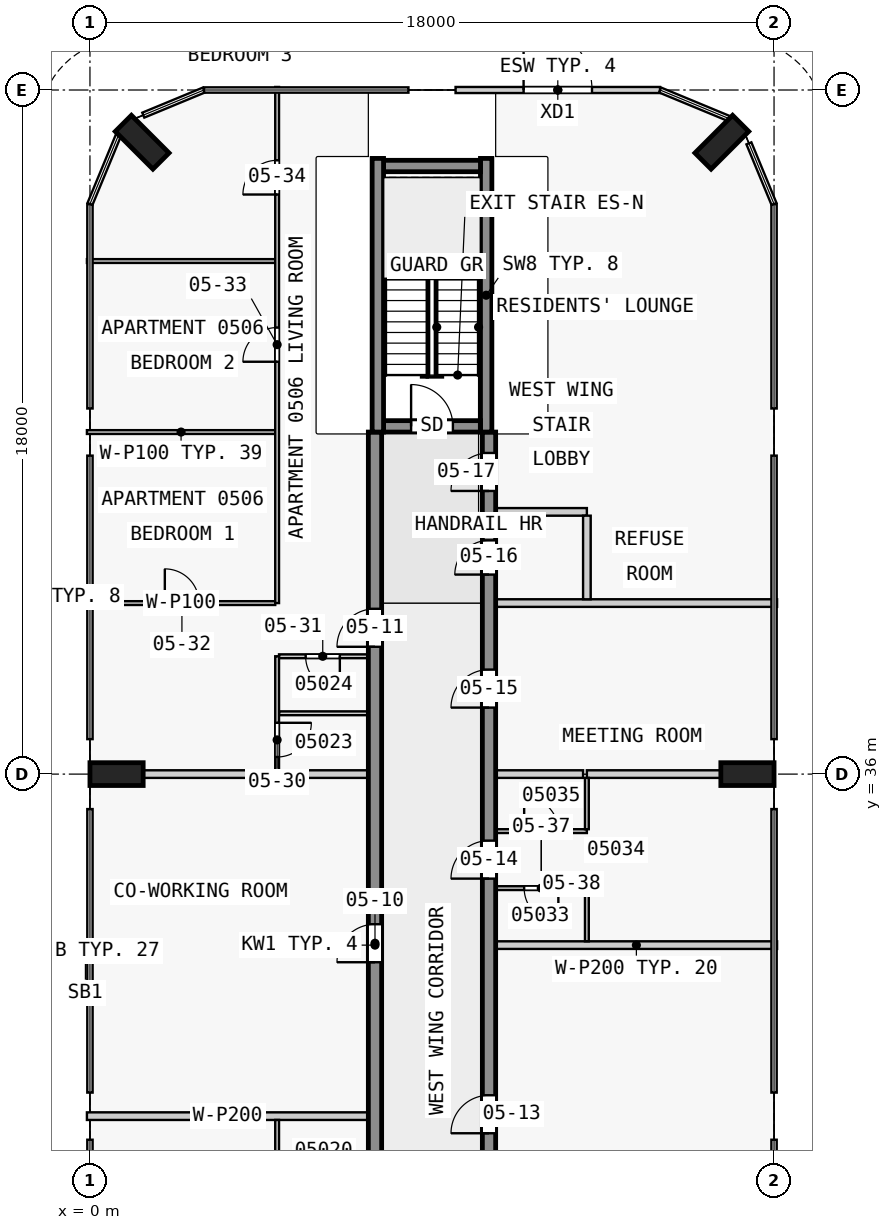
"""IFC4 building model, lengths in metres.
Left out: names, types, materials, properties, quantities, classifications, styles, units other than length and angle.
Written with IfcOpenShell. Run it as: python <this file> out.ifc"""

import sys

from ifc_helpers import new_model, si_unit, direction, frame, frame_2d, origin, origin_2d, place, context, subcontext, project, spatial, rectangle, extrude, element, fill, save


model = new_model("IFC4")
c1 = context("Model", 3, precision=1e-05, world=origin(), true_north=direction((0.0, 1.0)))
c2 = subcontext(c1, "Body", "Model", "MODEL_VIEW")
j1 = project(units=[si_unit("LENGTHUNIT", "METRE"), si_unit("PLANEANGLEUNIT", "RADIAN")], contexts=[c1])
p1 = place(None, origin())
s1 = spatial("IfcSite", under=j1, at=p1, CompositionType="ELEMENT")
p2 = place(p1, origin())
s2 = spatial("IfcBuilding", under=s1, at=p2, CompositionType="ELEMENT")
p3 = place(p2, frame((0.0, 0.0, 26.8)))
s3 = spatial("IfcBuildingStorey", under=s2, at=p3, CompositionType="ELEMENT", Elevation=26.8)
for number, where, z_axis, x_axis in (
    (1, (17.3, 36.0, 0.0), (0.0, 0.0, 1.0), (0.0, 1.0, 0.0)),
    (2, (16.626, 52.626, 0.0), (0.0, 0.0, 1.0), (-0.707, 0.707, 0.0)),
    (3, (1.374, 52.626, 0.0), (0.0, 0.0, 1.0), (0.707, 0.707, 0.0)),
    (4, (0.7, 36.0, 0.0), (0.0, 0.0, 1.0), (0.0, 1.0, 0.0)),
):
    element("IfcColumn", number, at=place(p3, frame(where, z_axis=z_axis, x_axis=x_axis)), inside=s3, PredefinedType="COLUMN", context=c2, shape_type="SweptSolid", body=[
        extrude(rectangle(XDim=0.6, YDim=1.4, at=origin_2d()), origin(), (0.0, 0.0, 1.0), 3.5),
    ])
p4 = place(p3, frame((7.725, 45.15, 0.0), z_axis=(0.0, 0.0, 1.0), x_axis=(1.0, 0.0, 0.0)))
e5 = element("IfcWall", 5, at=p4, inside=s3, PredefinedType="SHEAR", context=c2, shape_type="SweptSolid", body=[
    extrude(rectangle(XDim=2.55, YDim=0.3, at=frame_2d((1.275, 0.0))), origin(), (0.0, 0.0, 1.0), 3.5),
])
p5 = place(p4, frame((0.725, 0.0, 0.0)))
e6 = element("IfcOpeningElement", 6, at=p5, cuts=e5, PredefinedType="OPENING", context=c2, shape_type="SweptSolid", body=[
    extrude(rectangle(XDim=1.1, YDim=2.1, at=frame_2d((0.55, 1.05))), frame((0.0, 0.16, 0.0), z_axis=(0.0, -1.0, 0.0), x_axis=(1.0, 0.0, 0.0)), (0.0, 0.0, 1.0), 0.32),
])
p6 = place(p3, frame((7.725, 52.0, 0.0), z_axis=(0.0, 0.0, 1.0), x_axis=(1.0, 0.0, 0.0)))
e7 = element("IfcWall", 7, at=p6, inside=s3, PredefinedType="SHEAR", context=c2, shape_type="SweptSolid", body=[
    extrude(rectangle(XDim=2.55, YDim=0.3, at=frame_2d((1.275, 0.0))), origin(), (0.0, 0.0, 1.0), 3.5),
])
for number, where, z_axis, x_axis in (
    (8, (7.575, 45.0, 0.0), (0.0, 0.0, 1.0), (0.0, 1.0, 0.0)),
    (9, (10.425, 45.0, 0.0), (0.0, 0.0, 1.0), (0.0, 1.0, 0.0)),
):
    element("IfcWall", number, at=place(p3, frame(where, z_axis=z_axis, x_axis=x_axis)), inside=s3, PredefinedType="SHEAR", context=c2, shape_type="SweptSolid", body=[
        extrude(rectangle(XDim=7.2, YDim=0.3, at=frame_2d((3.6, 0.0))), origin(), (0.0, 0.0, 1.0), 3.5),
    ])
p7 = place(p3, frame((7.5, 18.0, 0.0), z_axis=(0.0, 0.0, 1.0), x_axis=(0.0, 1.0, 0.0)))
e10 = element("IfcWall", 10, at=p7, inside=s3, PredefinedType="SHEAR", context=c2, shape_type="SweptSolid", body=[
    extrude(rectangle(XDim=27.0, YDim=0.35, at=frame_2d((13.5, 0.0))), origin(), (0.0, 0.0, 1.0), 3.25),
])
p8 = place(p7, frame((4.05, 0.0, 0.0)))
e11 = element("IfcOpeningElement", 11, at=p8, cuts=e10, PredefinedType="OPENING", context=c2, shape_type="SweptSolid", body=[
    extrude(rectangle(XDim=1.0, YDim=2.1, at=frame_2d((0.5, 1.05))), frame((0.0, 0.185, 0.0), z_axis=(0.0, -1.0, 0.0), x_axis=(1.0, 0.0, 0.0)), (0.0, 0.0, 1.0), 0.37),
])
p9 = place(p7, frame((13.05, 0.0, 0.0)))
e12 = element("IfcOpeningElement", 12, at=p9, cuts=e10, PredefinedType="OPENING", context=c2, shape_type="SweptSolid", body=[
    extrude(rectangle(XDim=1.0, YDim=2.1, at=frame_2d((0.5, 1.05))), frame((0.0, 0.185, 0.0), z_axis=(0.0, -1.0, 0.0), x_axis=(1.0, 0.0, 0.0)), (0.0, 0.0, 1.0), 0.37),
])
p10 = place(p7, frame((21.35, 0.0, 0.0)))
e13 = element("IfcOpeningElement", 13, at=p10, cuts=e10, PredefinedType="OPENING", context=c2, shape_type="SweptSolid", body=[
    extrude(rectangle(XDim=1.0, YDim=2.1, at=frame_2d((0.5, 1.05))), frame((0.0, 0.185, 0.0), z_axis=(0.0, -1.0, 0.0), x_axis=(1.0, 0.0, 0.0)), (0.0, 0.0, 1.0), 0.37),
])
p11 = place(p3, frame((10.5, 18.0, 0.0), z_axis=(0.0, 0.0, 1.0), x_axis=(0.0, 1.0, 0.0)))
e14 = element("IfcWall", 14, at=p11, inside=s3, PredefinedType="SHEAR", context=c2, shape_type="SweptSolid", body=[
    extrude(rectangle(XDim=27.0, YDim=0.35, at=frame_2d((13.5, 0.0))), origin(), (0.0, 0.0, 1.0), 3.25),
])
p12 = place(p11, frame((1.75, 0.0, 0.0)))
e15 = element("IfcOpeningElement", 15, at=p12, cuts=e14, PredefinedType="OPENING", context=c2, shape_type="SweptSolid", body=[
    extrude(rectangle(XDim=1.0, YDim=2.1, at=frame_2d((0.5, 1.05))), frame((0.0, 0.185, 0.0), z_axis=(0.0, -1.0, 0.0), x_axis=(1.0, 0.0, 0.0)), (0.0, 0.0, 1.0), 0.37),
])
p13 = place(p11, frame((8.55, 0.0, 0.0)))
e16 = element("IfcOpeningElement", 16, at=p13, cuts=e14, PredefinedType="OPENING", context=c2, shape_type="SweptSolid", body=[
    extrude(rectangle(XDim=1.0, YDim=2.1, at=frame_2d((0.5, 1.05))), frame((0.0, 0.185, 0.0), z_axis=(0.0, -1.0, 0.0), x_axis=(1.0, 0.0, 0.0)), (0.0, 0.0, 1.0), 0.37),
])
p14 = place(p11, frame((15.25, 0.0, 0.0)))
e17 = element("IfcOpeningElement", 17, at=p14, cuts=e14, PredefinedType="OPENING", context=c2, shape_type="SweptSolid", body=[
    extrude(rectangle(XDim=1.0, YDim=2.1, at=frame_2d((0.5, 1.05))), frame((0.0, 0.185, 0.0), z_axis=(0.0, -1.0, 0.0), x_axis=(1.0, 0.0, 0.0)), (0.0, 0.0, 1.0), 0.37),
])
p15 = place(p11, frame((19.75, 0.0, 0.0)))
e18 = element("IfcOpeningElement", 18, at=p15, cuts=e14, PredefinedType="OPENING", context=c2, shape_type="SweptSolid", body=[
    extrude(rectangle(XDim=1.0, YDim=2.1, at=frame_2d((0.5, 1.05))), frame((0.0, 0.185, 0.0), z_axis=(0.0, -1.0, 0.0), x_axis=(1.0, 0.0, 0.0)), (0.0, 0.0, 1.0), 0.37),
])
p16 = place(p11, frame((23.25, 0.0, 0.0)))
e19 = element("IfcOpeningElement", 19, at=p16, cuts=e14, PredefinedType="OPENING", context=c2, shape_type="SweptSolid", body=[
    extrude(rectangle(XDim=0.9, YDim=2.1, at=frame_2d((0.45, 1.05))), frame((0.0, 0.185, 0.0), z_axis=(0.0, -1.0, 0.0), x_axis=(1.0, 0.0, 0.0)), (0.0, 0.0, 1.0), 0.37),
])
p17 = place(p11, frame((25.45, 0.0, 0.0)))
e20 = element("IfcOpeningElement", 20, at=p17, cuts=e14, PredefinedType="OPENING", context=c2, shape_type="SweptSolid", body=[
    extrude(rectangle(XDim=1.0, YDim=2.1, at=frame_2d((0.5, 1.05))), frame((0.0, 0.185, 0.0), z_axis=(0.0, -1.0, 0.0), x_axis=(1.0, 0.0, 0.0)), (0.0, 0.0, 1.0), 0.37),
])
p18 = place(p3, frame((9.62, 54.0, 0.0), z_axis=(0.0, 0.0, 1.0), x_axis=(1.0, 0.0, 0.0)))
e21 = element("IfcWall", 21, at=p18, inside=s3, PredefinedType="STANDARD", context=c2, shape_type="SweptSolid", body=[
    extrude(rectangle(XDim=5.38, YDim=0.16, at=frame_2d((2.69, 0.0))), origin(), (0.0, 0.0, 1.0), 3.25),
])
p19 = place(p18, frame((1.79, 0.0, 0.0)))
e22 = element("IfcOpeningElement", 22, at=p19, cuts=e21, PredefinedType="OPENING", context=c2, shape_type="SweptSolid", body=[
    extrude(rectangle(XDim=1.8, YDim=2.4, at=frame_2d((0.9, 1.2))), frame((0.0, 0.09, 0.0), z_axis=(0.0, -1.0, 0.0), x_axis=(1.0, 0.0, 0.0)), (0.0, 0.0, 1.0), 0.18),
])
for number, where, z_axis, x_axis in (
    (23, (7.325, 27.0, 0.0), (0.0, 0.0, 1.0), (-1.0, 0.0, 0.0)),
    (24, (18.08, 31.5, 0.0), (0.0, 0.0, 1.0), (-1.0, 0.0, 0.0)),
):
    element("IfcWall", number, at=place(p3, frame(where, z_axis=z_axis, x_axis=x_axis)), inside=s3, PredefinedType="PARTITIONING", context=c2, shape_type="SweptSolid", body=[
        extrude(rectangle(XDim=7.405, YDim=0.2, at=frame_2d((3.703, 0.0))), origin(), (0.0, 0.0, 1.0), 3.25),
    ])
p20 = place(p3, frame((13.075, 33.0, 0.0), z_axis=(0.0, 0.0, 1.0), x_axis=(-1.0, 0.0, 0.0)))
e25 = element("IfcWall", 25, at=p20, inside=s3, PredefinedType="PARTITIONING", context=c2, shape_type="SweptSolid", body=[
    extrude(rectangle(XDim=2.4, YDim=0.1, at=frame_2d((1.2, 0.0))), origin(), (0.0, 0.0, 1.0), 3.25),
])
p21 = place(p20, frame((0.75, 0.0, 0.0)))
e26 = element("IfcOpeningElement", 26, at=p21, cuts=e25, PredefinedType="OPENING", context=c2, shape_type="SweptSolid", body=[
    extrude(rectangle(XDim=0.9, YDim=2.1, at=frame_2d((0.45, 1.05))), frame((0.0, 0.06, 0.0), z_axis=(0.0, -1.0, 0.0), x_axis=(1.0, 0.0, 0.0)), (0.0, 0.0, 1.0), 0.12),
])
p22 = place(p3, frame((10.675, 34.5, 0.0), z_axis=(0.0, 0.0, 1.0), x_axis=(1.0, 0.0, 0.0)))
e27 = element("IfcWall", 27, at=p22, inside=s3, PredefinedType="PARTITIONING", context=c2, shape_type="SweptSolid", body=[
    extrude(rectangle(XDim=2.4, YDim=0.1, at=frame_2d((1.2, 0.0))), origin(), (0.0, 0.0, 1.0), 3.25),
])
p23 = place(p22, frame((0.75, 0.0, 0.0)))
e28 = element("IfcOpeningElement", 28, at=p23, cuts=e27, PredefinedType="OPENING", context=c2, shape_type="SweptSolid", body=[
    extrude(rectangle(XDim=0.9, YDim=2.1, at=frame_2d((0.45, 1.05))), frame((0.0, 0.06, 0.0), z_axis=(0.0, -1.0, 0.0), x_axis=(1.0, 0.0, 0.0)), (0.0, 0.0, 1.0), 0.12),
])
p24 = place(p3, frame((7.325, 36.0, 0.0), z_axis=(0.0, 0.0, 1.0), x_axis=(-1.0, 0.0, 0.0)))
e29 = element("IfcWall", 29, at=p24, inside=s3, PredefinedType="PARTITIONING", context=c2, shape_type="SweptSolid", body=[
    extrude(rectangle(XDim=5.925, YDim=0.2, at=frame_2d((2.962, 0.0))), origin(), (0.0, 0.0, 1.0), 3.25),
])
p25 = place(p3, frame((12.975, 36.0, 0.0), z_axis=(0.0, 0.0, 1.0), x_axis=(-1.0, 0.0, 0.0)))
e30 = element("IfcWall", 30, at=p25, inside=s3, PredefinedType="PARTITIONING", context=c2, shape_type="SweptSolid", body=[
    extrude(rectangle(XDim=2.3, YDim=0.2, at=frame_2d((1.15, 0.0))), origin(), (0.0, 0.0, 1.0), 3.25),
])
p26 = place(p3, frame((13.075, 36.0, 0.0), z_axis=(0.0, 0.0, 1.0), x_axis=(1.0, 0.0, 0.0)))
e31 = element("IfcWall", 31, at=p26, inside=s3, PredefinedType="PARTITIONING", context=c2, shape_type="SweptSolid", body=[
    extrude(rectangle(XDim=3.525, YDim=0.2, at=frame_2d((1.763, 0.0))), origin(), (0.0, 0.0, 1.0), 3.25),
])
p27 = place(p3, frame((7.325, 37.6, 0.0), z_axis=(0.0, 0.0, 1.0), x_axis=(-1.0, 0.0, 0.0)))
e32 = element("IfcWall", 32, at=p27, inside=s3, PredefinedType="PARTITIONING", context=c2, shape_type="SweptSolid", body=[
    extrude(rectangle(XDim=2.35, YDim=0.1, at=frame_2d((1.175, 0.0))), origin(), (0.0, 0.0, 1.0), 3.25),
])
p28 = place(p3, frame((7.325, 39.1, 0.0), z_axis=(0.0, 0.0, 1.0), x_axis=(-1.0, 0.0, 0.0)))
e33 = element("IfcWall", 33, at=p28, inside=s3, PredefinedType="PARTITIONING", context=c2, shape_type="SweptSolid", body=[
    extrude(rectangle(XDim=2.35, YDim=0.1, at=frame_2d((1.175, 0.0))), origin(), (0.0, 0.0, 1.0), 3.25),
])
p29 = place(p28, frame((0.75, 0.0, 0.0)))
e34 = element("IfcOpeningElement", 34, at=p29, cuts=e33, PredefinedType="OPENING", context=c2, shape_type="SweptSolid", body=[
    extrude(rectangle(XDim=0.9, YDim=2.1, at=frame_2d((0.45, 1.05))), frame((0.0, 0.06, 0.0), z_axis=(0.0, -1.0, 0.0), x_axis=(1.0, 0.0, 0.0)), (0.0, 0.0, 1.0), 0.12),
])
p30 = place(p3, frame((-0.08, 40.5, 0.0), z_axis=(0.0, 0.0, 1.0), x_axis=(1.0, 0.0, 0.0)))
e35 = element("IfcWall", 35, at=p30, inside=s3, PredefinedType="PARTITIONING", context=c2, shape_type="SweptSolid", body=[
    extrude(rectangle(XDim=4.955, YDim=0.1, at=frame_2d((2.478, 0.0))), origin(), (0.0, 0.0, 1.0), 3.25),
])
p31 = place(p30, frame((2.05, 0.0, 0.0)))
e36 = element("IfcOpeningElement", 36, at=p31, cuts=e35, PredefinedType="OPENING", context=c2, shape_type="SweptSolid", body=[
    extrude(rectangle(XDim=0.9, YDim=2.1, at=frame_2d((0.45, 1.05))), frame((0.0, 0.06, 0.0), z_axis=(0.0, -1.0, 0.0), x_axis=(1.0, 0.0, 0.0)), (0.0, 0.0, 1.0), 0.12),
])
p32 = place(p3, frame((18.08, 40.5, 0.0), z_axis=(0.0, 0.0, 1.0), x_axis=(-1.0, 0.0, 0.0)))
e37 = element("IfcWall", 37, at=p32, inside=s3, PredefinedType="PARTITIONING", context=c2, shape_type="SweptSolid", body=[
    extrude(rectangle(XDim=7.405, YDim=0.2, at=frame_2d((3.703, 0.0))), origin(), (0.0, 0.0, 1.0), 3.25),
])
p33 = place(p3, frame((13.075, 42.9, 0.0), z_axis=(0.0, 0.0, 1.0), x_axis=(-1.0, 0.0, 0.0)))
e38 = element("IfcWall", 38, at=p33, inside=s3, PredefinedType="PARTITIONING", context=c2, shape_type="SweptSolid", body=[
    extrude(rectangle(XDim=2.4, YDim=0.2, at=frame_2d((1.2, 0.0))), origin(), (0.0, 0.0, 1.0), 3.25),
])
for number, where, z_axis, x_axis in (
    (39, (4.875, 45.0, 0.0), (0.0, 0.0, 1.0), (-1.0, 0.0, 0.0)),
    (40, (4.875, 49.5, 0.0), (0.0, 0.0, 1.0), (-1.0, 0.0, 0.0)),
):
    element("IfcWall", number, at=place(p3, frame(where, z_axis=z_axis, x_axis=x_axis)), inside=s3, PredefinedType="PARTITIONING", context=c2, shape_type="SweptSolid", body=[
        extrude(rectangle(XDim=4.955, YDim=0.1, at=frame_2d((2.478, 0.0))), origin(), (0.0, 0.0, 1.0), 3.25),
    ])
p34 = place(p3, frame((4.925, 26.9, 0.0), z_axis=(0.0, 0.0, 1.0), x_axis=(0.0, -1.0, 0.0)))
e41 = element("IfcWall", 41, at=p34, inside=s3, PredefinedType="PARTITIONING", context=c2, shape_type="SweptSolid", body=[
    extrude(rectangle(XDim=1.65, YDim=0.1, at=frame_2d((0.825, 0.0))), origin(), (0.0, 0.0, 1.0), 3.25),
])
p35 = place(p3, frame((4.925, 39.1, 0.0), z_axis=(0.0, 0.0, 1.0), x_axis=(0.0, -1.0, 0.0)))
e42 = element("IfcWall", 42, at=p35, inside=s3, PredefinedType="PARTITIONING", context=c2, shape_type="SweptSolid", body=[
    extrude(rectangle(XDim=3.0, YDim=0.1, at=frame_2d((1.5, 0.0))), origin(), (0.0, 0.0, 1.0), 3.25),
])
p36 = place(p35, frame((1.75, 0.0, 0.0)))
e43 = element("IfcOpeningElement", 43, at=p36, cuts=e42, PredefinedType="OPENING", context=c2, shape_type="SweptSolid", body=[
    extrude(rectangle(XDim=0.9, YDim=2.1, at=frame_2d((0.45, 1.05))), frame((0.0, 0.06, 0.0), z_axis=(0.0, -1.0, 0.0), x_axis=(1.0, 0.0, 0.0)), (0.0, 0.0, 1.0), 0.12),
])
p37 = place(p3, frame((4.925, 40.5, 0.0), z_axis=(0.0, 0.0, 1.0), x_axis=(0.0, 1.0, 0.0)))
e44 = element("IfcWall", 44, at=p37, inside=s3, PredefinedType="PARTITIONING", context=c2, shape_type="SweptSolid", body=[
    extrude(rectangle(XDim=13.58, YDim=0.1, at=frame_2d((6.79, 0.0))), origin(), (0.0, 0.0, 1.0), 3.25),
])
p38 = place(p37, frame((6.35, 0.0, 0.0)))
e45 = element("IfcOpeningElement", 45, at=p38, cuts=e44, PredefinedType="OPENING", context=c2, shape_type="SweptSolid", body=[
    extrude(rectangle(XDim=0.9, YDim=2.1, at=frame_2d((0.45, 1.05))), frame((0.0, 0.06, 0.0), z_axis=(0.0, -1.0, 0.0), x_axis=(1.0, 0.0, 0.0)), (0.0, 0.0, 1.0), 0.12),
])
p39 = place(p37, frame((10.75, 0.0, 0.0)))
e46 = element("IfcOpeningElement", 46, at=p39, cuts=e44, PredefinedType="OPENING", context=c2, shape_type="SweptSolid", body=[
    extrude(rectangle(XDim=0.9, YDim=2.1, at=frame_2d((0.45, 1.05))), frame((0.0, 0.06, 0.0), z_axis=(0.0, -1.0, 0.0), x_axis=(1.0, 0.0, 0.0)), (0.0, 0.0, 1.0), 0.12),
])
for number, where, z_axis, x_axis in (
    (47, (13.075, 31.6, 0.0), (0.0, 0.0, 1.0), (0.0, 1.0, 0.0)),
    (48, (13.075, 34.55, 0.0), (0.0, 0.0, 1.0), (0.0, 1.0, 0.0)),
):
    element("IfcWall", number, at=place(p3, frame(where, z_axis=z_axis, x_axis=x_axis)), inside=s3, PredefinedType="PARTITIONING", context=c2, shape_type="SweptSolid", body=[
        extrude(rectangle(XDim=1.35, YDim=0.1, at=frame_2d((0.675, 0.0))), origin(), (0.0, 0.0, 1.0), 3.25),
    ])
p40 = place(p3, frame((13.075, 40.6, 0.0), z_axis=(0.0, 0.0, 1.0), x_axis=(0.0, 1.0, 0.0)))
e49 = element("IfcWall", 49, at=p40, inside=s3, PredefinedType="PARTITIONING", context=c2, shape_type="SweptSolid", body=[
    extrude(rectangle(XDim=2.2, YDim=0.2, at=frame_2d((1.1, 0.0))), origin(), (0.0, 0.0, 1.0), 3.25),
])
p41 = place(p19, origin())
e50 = element("IfcDoor", 50, at=p41, inside=s3, OperationType="SINGLE_SWING_LEFT", PredefinedType="DOOR", context=c2, shape_type="SweptSolid", body=[
    extrude(rectangle(XDim=1.8, YDim=2.4, at=frame_2d((0.9, 1.2))), frame((0.0, 0.025, 0.0), z_axis=(0.0, -1.0, 0.0), x_axis=(1.0, 0.0, 0.0)), (0.0, 0.0, 1.0), 0.05),
])
fill(e22, e50)
p42 = place(p5, origin())
e51 = element("IfcDoor", 51, at=p42, inside=s3, OperationType="SINGLE_SWING_LEFT", PredefinedType="DOOR", context=c2, shape_type="SweptSolid", body=[
    extrude(rectangle(XDim=1.1, YDim=2.1, at=frame_2d((0.55, 1.05))), frame((0.0, 0.025, 0.0), z_axis=(0.0, -1.0, 0.0), x_axis=(1.0, 0.0, 0.0)), (0.0, 0.0, 1.0), 0.05),
])
fill(e6, e51)
p43 = place(p9, origin())
e52 = element("IfcDoor", 52, at=p43, inside=s3, OperationType="SINGLE_SWING_RIGHT", PredefinedType="DOOR", context=c2, shape_type="SweptSolid", body=[
    extrude(rectangle(XDim=1.0, YDim=2.1, at=frame_2d((0.5, 1.05))), frame((0.0, 0.025, 0.0), z_axis=(0.0, -1.0, 0.0), x_axis=(1.0, 0.0, 0.0)), (0.0, 0.0, 1.0), 0.05),
])
fill(e12, e52)
p44 = place(p10, origin())
e53 = element("IfcDoor", 53, at=p44, inside=s3, OperationType="SINGLE_SWING_RIGHT", PredefinedType="DOOR", context=c2, shape_type="SweptSolid", body=[
    extrude(rectangle(XDim=1.0, YDim=2.1, at=frame_2d((0.5, 1.05))), frame((0.0, 0.025, 0.0), z_axis=(0.0, -1.0, 0.0), x_axis=(1.0, 0.0, 0.0)), (0.0, 0.0, 1.0), 0.05),
])
fill(e13, e53)
p45 = place(p13, origin())
e54 = element("IfcDoor", 54, at=p45, inside=s3, OperationType="SINGLE_SWING_LEFT", PredefinedType="DOOR", context=c2, shape_type="SweptSolid", body=[
    extrude(rectangle(XDim=1.0, YDim=2.1, at=frame_2d((0.5, 1.05))), frame((0.0, 0.025, 0.0), z_axis=(0.0, -1.0, 0.0), x_axis=(1.0, 0.0, 0.0)), (0.0, 0.0, 1.0), 0.05),
])
fill(e16, e54)
p46 = place(p14, origin())
e55 = element("IfcDoor", 55, at=p46, inside=s3, OperationType="SINGLE_SWING_RIGHT", PredefinedType="DOOR", context=c2, shape_type="SweptSolid", body=[
    extrude(rectangle(XDim=1.0, YDim=2.1, at=frame_2d((0.5, 1.05))), frame((0.0, 0.025, 0.0), z_axis=(0.0, -1.0, 0.0), x_axis=(1.0, 0.0, 0.0)), (0.0, 0.0, 1.0), 0.05),
])
fill(e17, e55)
p47 = place(p15, origin())
e56 = element("IfcDoor", 56, at=p47, inside=s3, OperationType="SINGLE_SWING_RIGHT", PredefinedType="DOOR", context=c2, shape_type="SweptSolid", body=[
    extrude(rectangle(XDim=1.0, YDim=2.1, at=frame_2d((0.5, 1.05))), frame((0.0, 0.025, 0.0), z_axis=(0.0, -1.0, 0.0), x_axis=(1.0, 0.0, 0.0)), (0.0, 0.0, 1.0), 0.05),
])
fill(e18, e56)
p48 = place(p16, origin())
e57 = element("IfcDoor", 57, at=p48, inside=s3, OperationType="SINGLE_SWING_RIGHT", PredefinedType="DOOR", context=c2, shape_type="SweptSolid", body=[
    extrude(rectangle(XDim=0.9, YDim=2.1, at=frame_2d((0.45, 1.05))), frame((0.0, 0.025, 0.0), z_axis=(0.0, -1.0, 0.0), x_axis=(1.0, 0.0, 0.0)), (0.0, 0.0, 1.0), 0.05),
])
fill(e19, e57)
p49 = place(p17, origin())
e58 = element("IfcDoor", 58, at=p49, inside=s3, OperationType="SINGLE_SWING_RIGHT", PredefinedType="DOOR", context=c2, shape_type="SweptSolid", body=[
    extrude(rectangle(XDim=1.0, YDim=2.1, at=frame_2d((0.5, 1.05))), frame((0.0, 0.025, 0.0), z_axis=(0.0, -1.0, 0.0), x_axis=(1.0, 0.0, 0.0)), (0.0, 0.0, 1.0), 0.05),
])
fill(e20, e58)
p50 = place(p36, origin())
e59 = element("IfcDoor", 59, at=p50, inside=s3, OperationType="SINGLE_SWING_RIGHT", PredefinedType="DOOR", context=c2, shape_type="SweptSolid", body=[
    extrude(rectangle(XDim=0.9, YDim=2.1, at=frame_2d((0.45, 1.05))), frame((0.0, 0.025, 0.0), z_axis=(0.0, -1.0, 0.0), x_axis=(1.0, 0.0, 0.0)), (0.0, 0.0, 1.0), 0.05),
])
fill(e43, e59)
p51 = place(p29, origin())
e60 = element("IfcDoor", 60, at=p51, inside=s3, OperationType="SINGLE_SWING_RIGHT", PredefinedType="DOOR", context=c2, shape_type="SweptSolid", body=[
    extrude(rectangle(XDim=0.9, YDim=2.1, at=frame_2d((0.45, 1.05))), frame((0.0, 0.025, 0.0), z_axis=(0.0, -1.0, 0.0), x_axis=(1.0, 0.0, 0.0)), (0.0, 0.0, 1.0), 0.05),
])
fill(e34, e60)
p52 = place(p31, origin())
e61 = element("IfcDoor", 61, at=p52, inside=s3, OperationType="SINGLE_SWING_RIGHT", PredefinedType="DOOR", context=c2, shape_type="SweptSolid", body=[
    extrude(rectangle(XDim=0.9, YDim=2.1, at=frame_2d((0.45, 1.05))), frame((0.0, 0.025, 0.0), z_axis=(0.0, -1.0, 0.0), x_axis=(1.0, 0.0, 0.0)), (0.0, 0.0, 1.0), 0.05),
])
fill(e36, e61)
p53 = place(p38, origin())
e62 = element("IfcDoor", 62, at=p53, inside=s3, OperationType="SINGLE_SWING_RIGHT", PredefinedType="DOOR", context=c2, shape_type="SweptSolid", body=[
    extrude(rectangle(XDim=0.9, YDim=2.1, at=frame_2d((0.45, 1.05))), frame((0.0, 0.025, 0.0), z_axis=(0.0, -1.0, 0.0), x_axis=(1.0, 0.0, 0.0)), (0.0, 0.0, 1.0), 0.05),
])
fill(e45, e62)
p54 = place(p39, origin())
e63 = element("IfcDoor", 63, at=p54, inside=s3, OperationType="SINGLE_SWING_RIGHT", PredefinedType="DOOR", context=c2, shape_type="SweptSolid", body=[
    extrude(rectangle(XDim=0.9, YDim=2.1, at=frame_2d((0.45, 1.05))), frame((0.0, 0.025, 0.0), z_axis=(0.0, -1.0, 0.0), x_axis=(1.0, 0.0, 0.0)), (0.0, 0.0, 1.0), 0.05),
])
fill(e46, e63)
p55 = place(p21, origin())
e64 = element("IfcDoor", 64, at=p55, inside=s3, OperationType="SINGLE_SWING_RIGHT", PredefinedType="DOOR", context=c2, shape_type="SweptSolid", body=[
    extrude(rectangle(XDim=0.9, YDim=2.1, at=frame_2d((0.45, 1.05))), frame((0.0, 0.025, 0.0), z_axis=(0.0, -1.0, 0.0), x_axis=(1.0, 0.0, 0.0)), (0.0, 0.0, 1.0), 0.05),
])
fill(e26, e64)
p56 = place(p23, origin())
e65 = element("IfcDoor", 65, at=p56, inside=s3, OperationType="SINGLE_SWING_RIGHT", PredefinedType="DOOR", context=c2, shape_type="SweptSolid", body=[
    extrude(rectangle(XDim=0.9, YDim=2.1, at=frame_2d((0.45, 1.05))), frame((0.0, 0.025, 0.0), z_axis=(0.0, -1.0, 0.0), x_axis=(1.0, 0.0, 0.0)), (0.0, 0.0, 1.0), 0.05),
])
fill(e28, e65)
save(model, sys.argv[1])
